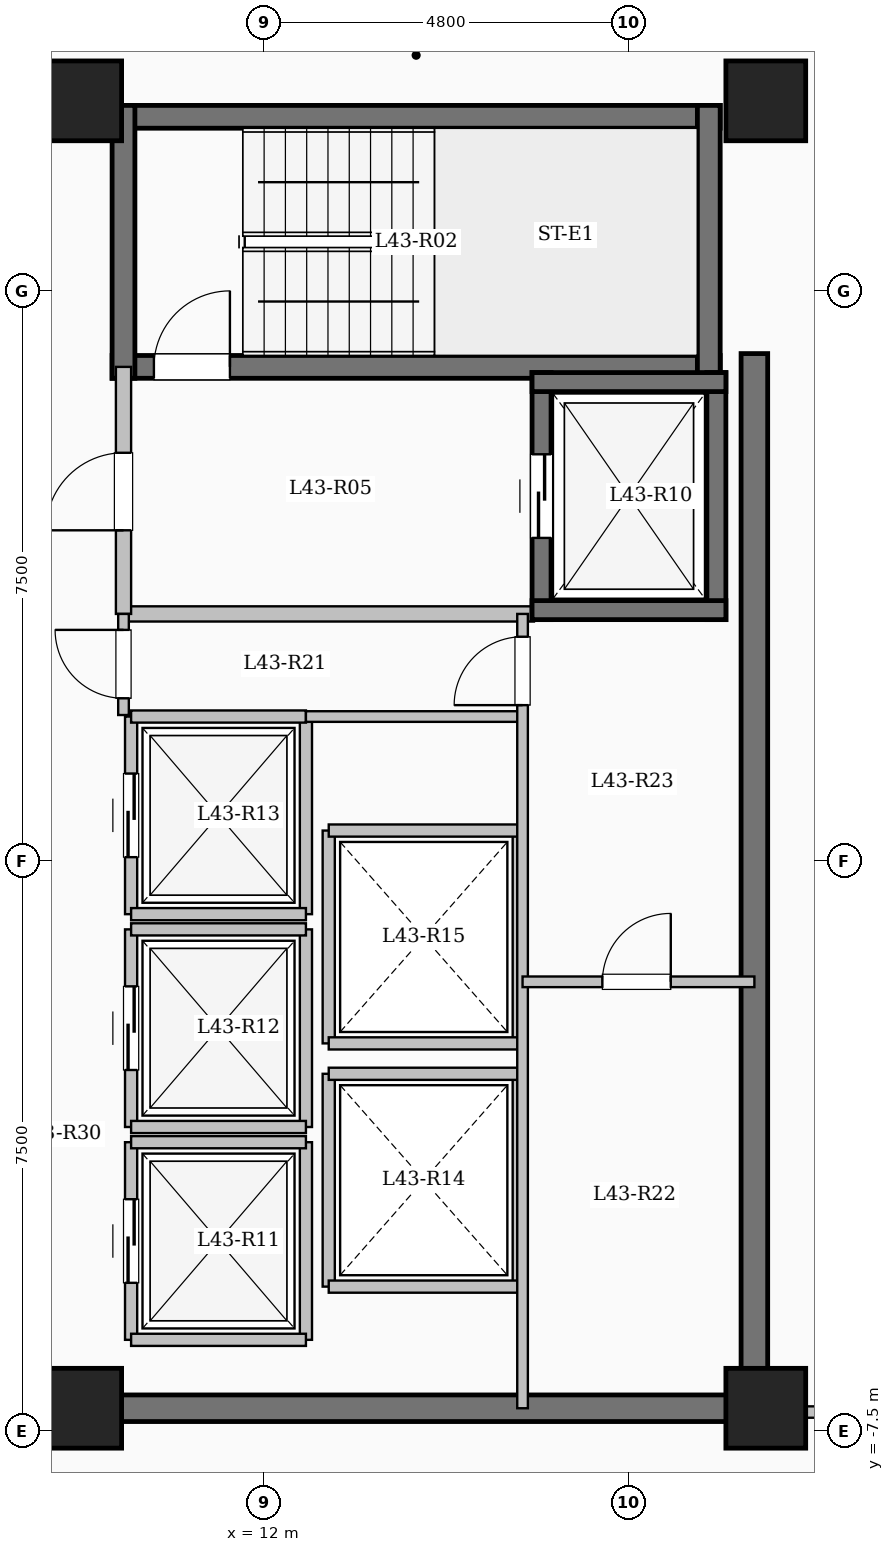
"""IFC4 building model, lengths in metres.
Left out: names, types, materials, properties, quantities, classifications, styles, units other than length and angle.
Written with IfcOpenShell. Run it as: python <this file> out.ifc"""

import sys

from ifc_helpers import new_model, si_unit, direction, frame, frame_2d, origin, origin_2d, place, context, subcontext, project, spatial, rectangle, extrude, element, fill, save


model = new_model("IFC4")
c1 = context("Model", 3, precision=1e-05, world=origin(), true_north=direction((0.0, 1.0)))
c2 = subcontext(c1, "Body", "Model", "MODEL_VIEW")
j1 = project(units=[si_unit("LENGTHUNIT", "METRE"), si_unit("PLANEANGLEUNIT", "RADIAN")], contexts=[c1])
p1 = place(None, origin())
s1 = spatial("IfcSite", under=j1, at=p1, CompositionType="ELEMENT")
p2 = place(p1, origin())
s2 = spatial("IfcBuilding", under=s1, at=p2, CompositionType="ELEMENT")
p3 = place(p2, frame((0.0, 0.0, 159.4)))
s3 = spatial("IfcBuildingStorey", under=s2, at=p3, CompositionType="ELEMENT", Elevation=159.4)
for number, where, z_axis, x_axis in (
    (1, (9.6, -7.2, 0.0), (0.0, 0.0, 1.0), (1.0, 0.0, 0.0)),
    (2, (9.6, 10.0, 0.0), (0.0, 0.0, 1.0), (1.0, 0.0, 0.0)),
    (3, (18.6, -7.2, 0.0), (0.0, 0.0, 1.0), (1.0, 0.0, 0.0)),
    (4, (18.6, 10.0, 0.0), (0.0, 0.0, 1.0), (1.0, 0.0, 0.0)),
):
    element("IfcColumn", number, at=place(p3, frame(where, z_axis=z_axis, x_axis=x_axis)), inside=s3, PredefinedType="COLUMN", context=c2, shape_type="SweptSolid", body=[
        extrude(rectangle(XDim=1.05, YDim=1.05, at=origin_2d()), origin(), (0.0, 0.0, 1.0), 3.35),
    ])
p4 = place(p3, frame((10.0, 9.79, 0.0), z_axis=(0.0, 0.0, 1.0), x_axis=(1.0, 0.0, 0.0)))
e5 = element("IfcWall", 5, at=p4, inside=s3, PredefinedType="SHEAR", context=c2, shape_type="SweptSolid", body=[
    extrude(rectangle(XDim=8.0, YDim=0.3, at=frame_2d((4.0, 0.0))), origin(), (0.0, 0.0, 1.0), 3.35),
])
p5 = place(p3, frame((10.0, 6.5, 0.0), z_axis=(0.0, 0.0, 1.0), x_axis=(1.0, 0.0, 0.0)))
e6 = element("IfcWall", 6, at=p5, inside=s3, PredefinedType="SHEAR", context=c2, shape_type="SweptSolid", body=[
    extrude(rectangle(XDim=8.0, YDim=0.3, at=frame_2d((4.0, 0.0))), origin(), (0.0, 0.0, 1.0), 3.35),
])
p6 = place(p5, frame((0.55, 0.0, 0.0)))
e7 = element("IfcOpeningElement", 7, at=p6, cuts=e6, PredefinedType="OPENING", context=c2, shape_type="SweptSolid", body=[
    extrude(rectangle(XDim=1.0, YDim=2.15, at=frame_2d((0.5, 1.075))), frame((0.0, 0.16, 0.0), z_axis=(0.0, -1.0, 0.0), x_axis=(1.0, 0.0, 0.0)), (0.0, 0.0, 1.0), 0.32),
])
for number, where, z_axis, x_axis in (
    (8, (10.15, 6.35, 0.0), (0.0, 0.0, 1.0), (0.0, 1.0, 0.0)),
    (9, (17.85, 6.35, 0.0), (0.0, 0.0, 1.0), (0.0, 1.0, 0.0)),
):
    element("IfcWall", number, at=place(p3, frame(where, z_axis=z_axis, x_axis=x_axis)), inside=s3, PredefinedType="SHEAR", context=c2, shape_type="SweptSolid", body=[
        extrude(rectangle(XDim=3.59, YDim=0.3, at=frame_2d((1.795, 0.0))), origin(), (0.0, 0.0, 1.0), 3.35),
    ])
p7 = place(p3, frame((10.15, 3.25, 0.0), z_axis=(0.0, 0.0, 1.0), x_axis=(1.0, 0.0, 0.0)))
e10 = element("IfcWall", 10, at=p7, inside=s3, PredefinedType="SOLIDWALL", context=c2, shape_type="SweptSolid", body=[
    extrude(rectangle(XDim=5.4, YDim=0.2, at=frame_2d((2.7, 0.0))), origin(), (0.0, 0.0, 1.0), 3.1),
])
p8 = place(p3, frame((10.15, 3.25, 0.0), z_axis=(0.0, 0.0, 1.0), x_axis=(0.0, 1.0, 0.0)))
e11 = element("IfcWall", 11, at=p8, inside=s3, PredefinedType="SOLIDWALL", context=c2, shape_type="SweptSolid", body=[
    extrude(rectangle(XDim=3.25, YDim=0.2, at=frame_2d((1.625, 0.0))), origin(), (0.0, 0.0, 1.0), 3.1),
])
p9 = place(p8, frame((1.1, 0.0, 0.0)))
e12 = element("IfcOpeningElement", 12, at=p9, cuts=e11, PredefinedType="OPENING", context=c2, shape_type="SweptSolid", body=[
    extrude(rectangle(XDim=1.02, YDim=2.15, at=frame_2d((0.51, 1.075))), frame((0.0, 0.11, 0.0), z_axis=(0.0, -1.0, 0.0), x_axis=(1.0, 0.0, 0.0)), (0.0, 0.0, 1.0), 0.22),
])
p10 = place(p3, frame((15.65, 3.175, 0.0), z_axis=(0.0, 0.0, 1.0), x_axis=(0.0, 1.0, 0.0)))
e13 = element("IfcWall", 13, at=p10, inside=s3, PredefinedType="SHEAR", context=c2, shape_type="SweptSolid", body=[
    extrude(rectangle(XDim=3.25, YDim=0.25, at=frame_2d((1.625, 0.0))), origin(), (0.0, 0.0, 1.0), 3.35),
])
p11 = place(p10, frame((1.075, 0.0, 0.0)))
e14 = element("IfcOpeningElement", 14, at=p11, cuts=e13, PredefinedType="OPENING", context=c2, shape_type="SweptSolid", body=[
    extrude(rectangle(XDim=1.1, YDim=2.15, at=frame_2d((0.55, 1.075))), frame((0.0, 0.135, 0.0), z_axis=(0.0, -1.0, 0.0), x_axis=(1.0, 0.0, 0.0)), (0.0, 0.0, 1.0), 0.27),
])
p12 = place(p3, frame((17.95, 3.175, 0.0), z_axis=(0.0, 0.0, 1.0), x_axis=(0.0, 1.0, 0.0)))
e15 = element("IfcWall", 15, at=p12, inside=s3, PredefinedType="SHEAR", context=c2, shape_type="SweptSolid", body=[
    extrude(rectangle(XDim=3.25, YDim=0.25, at=frame_2d((1.625, 0.0))), origin(), (0.0, 0.0, 1.0), 3.35),
])
for number, where, z_axis, x_axis in (
    (16, (15.525, 3.3, 0.0), (0.0, 0.0, 1.0), (1.0, 0.0, 0.0)),
    (17, (15.525, 6.3, 0.0), (0.0, 0.0, 1.0), (1.0, 0.0, 0.0)),
):
    element("IfcWall", number, at=place(p3, frame(where, z_axis=z_axis, x_axis=x_axis)), inside=s3, PredefinedType="SHEAR", context=c2, shape_type="SweptSolid", body=[
        extrude(rectangle(XDim=2.55, YDim=0.25, at=frame_2d((1.275, 0.0))), origin(), (0.0, 0.0, 1.0), 3.35),
    ])
p13 = place(p3, frame((10.25, -6.3, 0.0), z_axis=(0.0, 0.0, 1.0), x_axis=(0.0, 1.0, 0.0)))
e18 = element("IfcWall", 18, at=p13, inside=s3, PredefinedType="SOLIDWALL", context=c2, shape_type="SweptSolid", body=[
    extrude(rectangle(XDim=2.6, YDim=0.16, at=frame_2d((1.3, 0.0))), origin(), (0.0, 0.0, 1.0), 3.1),
])
p14 = place(p13, frame((0.75, 0.0, 0.0)))
e19 = element("IfcOpeningElement", 19, at=p14, cuts=e18, PredefinedType="OPENING", context=c2, shape_type="SweptSolid", body=[
    extrude(rectangle(XDim=1.1, YDim=2.15, at=frame_2d((0.55, 1.075))), frame((0.0, 0.09, 0.0), z_axis=(0.0, -1.0, 0.0), x_axis=(1.0, 0.0, 0.0)), (0.0, 0.0, 1.0), 0.18),
])
p15 = place(p3, frame((12.55, -6.3, 0.0), z_axis=(0.0, 0.0, 1.0), x_axis=(0.0, 1.0, 0.0)))
e20 = element("IfcWall", 20, at=p15, inside=s3, PredefinedType="SOLIDWALL", context=c2, shape_type="SweptSolid", body=[
    extrude(rectangle(XDim=2.6, YDim=0.16, at=frame_2d((1.3, 0.0))), origin(), (0.0, 0.0, 1.0), 3.1),
])
for number, where, z_axis, x_axis in (
    (21, (10.25, -6.3, 0.0), (0.0, 0.0, 1.0), (1.0, 0.0, 0.0)),
    (22, (10.25, -3.7, 0.0), (0.0, 0.0, 1.0), (1.0, 0.0, 0.0)),
):
    element("IfcWall", number, at=place(p3, frame(where, z_axis=z_axis, x_axis=x_axis)), inside=s3, PredefinedType="SOLIDWALL", context=c2, shape_type="SweptSolid", body=[
        extrude(rectangle(XDim=2.3, YDim=0.16, at=frame_2d((1.15, 0.0))), origin(), (0.0, 0.0, 1.0), 3.1),
    ])
p16 = place(p3, frame((10.25, -3.5, 0.0), z_axis=(0.0, 0.0, 1.0), x_axis=(0.0, 1.0, 0.0)))
e23 = element("IfcWall", 23, at=p16, inside=s3, PredefinedType="SOLIDWALL", context=c2, shape_type="SweptSolid", body=[
    extrude(rectangle(XDim=2.6, YDim=0.16, at=frame_2d((1.3, 0.0))), origin(), (0.0, 0.0, 1.0), 3.1),
])
p17 = place(p16, frame((0.75, 0.0, 0.0)))
e24 = element("IfcOpeningElement", 24, at=p17, cuts=e23, PredefinedType="OPENING", context=c2, shape_type="SweptSolid", body=[
    extrude(rectangle(XDim=1.1, YDim=2.15, at=frame_2d((0.55, 1.075))), frame((0.0, 0.09, 0.0), z_axis=(0.0, -1.0, 0.0), x_axis=(1.0, 0.0, 0.0)), (0.0, 0.0, 1.0), 0.18),
])
p18 = place(p3, frame((12.55, -3.5, 0.0), z_axis=(0.0, 0.0, 1.0), x_axis=(0.0, 1.0, 0.0)))
e25 = element("IfcWall", 25, at=p18, inside=s3, PredefinedType="SOLIDWALL", context=c2, shape_type="SweptSolid", body=[
    extrude(rectangle(XDim=2.6, YDim=0.16, at=frame_2d((1.3, 0.0))), origin(), (0.0, 0.0, 1.0), 3.1),
])
for number, where, z_axis, x_axis in (
    (26, (10.25, -3.5, 0.0), (0.0, 0.0, 1.0), (1.0, 0.0, 0.0)),
    (27, (10.25, -0.9, 0.0), (0.0, 0.0, 1.0), (1.0, 0.0, 0.0)),
):
    element("IfcWall", number, at=place(p3, frame(where, z_axis=z_axis, x_axis=x_axis)), inside=s3, PredefinedType="SOLIDWALL", context=c2, shape_type="SweptSolid", body=[
        extrude(rectangle(XDim=2.3, YDim=0.16, at=frame_2d((1.15, 0.0))), origin(), (0.0, 0.0, 1.0), 3.1),
    ])
p19 = place(p3, frame((10.25, -0.7, 0.0), z_axis=(0.0, 0.0, 1.0), x_axis=(0.0, 1.0, 0.0)))
e28 = element("IfcWall", 28, at=p19, inside=s3, PredefinedType="SOLIDWALL", context=c2, shape_type="SweptSolid", body=[
    extrude(rectangle(XDim=2.6, YDim=0.16, at=frame_2d((1.3, 0.0))), origin(), (0.0, 0.0, 1.0), 3.1),
])
p20 = place(p19, frame((0.75, 0.0, 0.0)))
e29 = element("IfcOpeningElement", 29, at=p20, cuts=e28, PredefinedType="OPENING", context=c2, shape_type="SweptSolid", body=[
    extrude(rectangle(XDim=1.1, YDim=2.15, at=frame_2d((0.55, 1.075))), frame((0.0, 0.09, 0.0), z_axis=(0.0, -1.0, 0.0), x_axis=(1.0, 0.0, 0.0)), (0.0, 0.0, 1.0), 0.18),
])
p21 = place(p3, frame((12.55, -0.7, 0.0), z_axis=(0.0, 0.0, 1.0), x_axis=(0.0, 1.0, 0.0)))
e30 = element("IfcWall", 30, at=p21, inside=s3, PredefinedType="SOLIDWALL", context=c2, shape_type="SweptSolid", body=[
    extrude(rectangle(XDim=2.6, YDim=0.16, at=frame_2d((1.3, 0.0))), origin(), (0.0, 0.0, 1.0), 3.1),
])
for number, where, z_axis, x_axis in (
    (31, (10.25, -0.7, 0.0), (0.0, 0.0, 1.0), (1.0, 0.0, 0.0)),
    (32, (10.25, 1.9, 0.0), (0.0, 0.0, 1.0), (1.0, 0.0, 0.0)),
):
    element("IfcWall", number, at=place(p3, frame(where, z_axis=z_axis, x_axis=x_axis)), inside=s3, PredefinedType="SOLIDWALL", context=c2, shape_type="SweptSolid", body=[
        extrude(rectangle(XDim=2.3, YDim=0.16, at=frame_2d((1.15, 0.0))), origin(), (0.0, 0.0, 1.0), 3.1),
    ])
for number, where, z_axis, x_axis in (
    (33, (12.85, -5.6, 0.0), (0.0, 0.0, 1.0), (0.0, 1.0, 0.0)),
    (34, (15.35, -5.6, 0.0), (0.0, 0.0, 1.0), (0.0, 1.0, 0.0)),
):
    element("IfcWall", number, at=place(p3, frame(where, z_axis=z_axis, x_axis=x_axis)), inside=s3, PredefinedType="SOLIDWALL", context=c2, shape_type="SweptSolid", body=[
        extrude(rectangle(XDim=2.8, YDim=0.16, at=frame_2d((1.4, 0.0))), origin(), (0.0, 0.0, 1.0), 3.1),
    ])
for number, where, z_axis, x_axis in (
    (35, (12.85, -5.6, 0.0), (0.0, 0.0, 1.0), (1.0, 0.0, 0.0)),
    (36, (12.85, -2.8, 0.0), (0.0, 0.0, 1.0), (1.0, 0.0, 0.0)),
):
    element("IfcWall", number, at=place(p3, frame(where, z_axis=z_axis, x_axis=x_axis)), inside=s3, PredefinedType="SOLIDWALL", context=c2, shape_type="SweptSolid", body=[
        extrude(rectangle(XDim=2.5, YDim=0.16, at=frame_2d((1.25, 0.0))), origin(), (0.0, 0.0, 1.0), 3.1),
    ])
for number, where, z_axis, x_axis in (
    (37, (12.85, -2.4, 0.0), (0.0, 0.0, 1.0), (0.0, 1.0, 0.0)),
    (38, (15.35, -2.4, 0.0), (0.0, 0.0, 1.0), (0.0, 1.0, 0.0)),
):
    element("IfcWall", number, at=place(p3, frame(where, z_axis=z_axis, x_axis=x_axis)), inside=s3, PredefinedType="SOLIDWALL", context=c2, shape_type="SweptSolid", body=[
        extrude(rectangle(XDim=2.8, YDim=0.16, at=frame_2d((1.4, 0.0))), origin(), (0.0, 0.0, 1.0), 3.1),
    ])
for number, where, z_axis, x_axis in (
    (39, (12.85, -2.4, 0.0), (0.0, 0.0, 1.0), (1.0, 0.0, 0.0)),
    (40, (12.85, 0.4, 0.0), (0.0, 0.0, 1.0), (1.0, 0.0, 0.0)),
):
    element("IfcWall", number, at=place(p3, frame(where, z_axis=z_axis, x_axis=x_axis)), inside=s3, PredefinedType="SOLIDWALL", context=c2, shape_type="SweptSolid", body=[
        extrude(rectangle(XDim=2.5, YDim=0.16, at=frame_2d((1.25, 0.0))), origin(), (0.0, 0.0, 1.0), 3.1),
    ])
p22 = place(p3, frame((18.45, -7.375, 0.0), z_axis=(0.0, 0.0, 1.0), x_axis=(0.0, 1.0, 0.0)))
e41 = element("IfcWall", 41, at=p22, inside=s3, PredefinedType="SHEAR", context=c2, shape_type="SweptSolid", body=[
    extrude(rectangle(XDim=14.05, YDim=0.35, at=frame_2d((7.025, 0.0))), origin(), (0.0, 0.0, 1.0), 3.35),
])
p23 = place(p3, frame((10.075, -7.2, 0.0), z_axis=(0.0, 0.0, 1.0), x_axis=(1.0, 0.0, 0.0)))
e42 = element("IfcWall", 42, at=p23, inside=s3, PredefinedType="SHEAR", context=c2, shape_type="SweptSolid", body=[
    extrude(rectangle(XDim=8.55, YDim=0.35, at=frame_2d((4.275, 0.0))), origin(), (0.0, 0.0, 1.0), 3.35),
])
p24 = place(p3, frame((12.55, 1.9, 0.0), z_axis=(0.0, 0.0, 1.0), x_axis=(1.0, 0.0, 0.0)))
e43 = element("IfcWall", 43, at=p24, inside=s3, PredefinedType="PARTITIONING", context=c2, shape_type="SweptSolid", body=[
    extrude(rectangle(XDim=2.85, YDim=0.14, at=frame_2d((1.425, 0.0))), origin(), (0.0, 0.0, 1.0), 3.1),
])
p25 = place(p3, frame((10.15, 1.92, 0.0), z_axis=(0.0, 0.0, 1.0), x_axis=(0.0, 1.0, 0.0)))
e44 = element("IfcWall", 44, at=p25, inside=s3, PredefinedType="PARTITIONING", context=c2, shape_type="SweptSolid", body=[
    extrude(rectangle(XDim=1.33, YDim=0.14, at=frame_2d((0.665, 0.0))), origin(), (0.0, 0.0, 1.0), 3.1),
])
p26 = place(p25, frame((0.22, 0.0, 0.0)))
e45 = element("IfcOpeningElement", 45, at=p26, cuts=e44, PredefinedType="OPENING", context=c2, shape_type="SweptSolid", body=[
    extrude(rectangle(XDim=0.9, YDim=2.08, at=frame_2d((0.45, 1.04))), frame((0.0, 0.08, 0.0), z_axis=(0.0, -1.0, 0.0), x_axis=(1.0, 0.0, 0.0)), (0.0, 0.0, 1.0), 0.16),
])
p27 = place(p3, frame((15.4, -7.2, 0.0), z_axis=(0.0, 0.0, 1.0), x_axis=(0.0, 1.0, 0.0)))
e46 = element("IfcWall", 46, at=p27, inside=s3, PredefinedType="PARTITIONING", context=c2, shape_type="SweptSolid", body=[
    extrude(rectangle(XDim=10.45, YDim=0.14, at=frame_2d((5.225, 0.0))), origin(), (0.0, 0.0, 1.0), 3.1),
])
p28 = place(p27, frame((9.25, 0.0, 0.0)))
e47 = element("IfcOpeningElement", 47, at=p28, cuts=e46, PredefinedType="OPENING", context=c2, shape_type="SweptSolid", body=[
    extrude(rectangle(XDim=0.9, YDim=2.08, at=frame_2d((0.45, 1.04))), frame((0.0, 0.08, 0.0), z_axis=(0.0, -1.0, 0.0), x_axis=(1.0, 0.0, 0.0)), (0.0, 0.0, 1.0), 0.16),
])
p29 = place(p3, frame((15.4, -1.59, 0.0), z_axis=(0.0, 0.0, 1.0), x_axis=(1.0, 0.0, 0.0)))
e48 = element("IfcWall", 48, at=p29, inside=s3, PredefinedType="PARTITIONING", context=c2, shape_type="SweptSolid", body=[
    extrude(rectangle(XDim=3.05, YDim=0.14, at=frame_2d((1.525, 0.0))), origin(), (0.0, 0.0, 1.0), 3.1),
])
p30 = place(p29, frame((1.05, 0.0, 0.0)))
e49 = element("IfcOpeningElement", 49, at=p30, cuts=e48, PredefinedType="OPENING", context=c2, shape_type="SweptSolid", body=[
    extrude(rectangle(XDim=0.9, YDim=2.08, at=frame_2d((0.45, 1.04))), frame((0.0, 0.08, 0.0), z_axis=(0.0, -1.0, 0.0), x_axis=(1.0, 0.0, 0.0)), (0.0, 0.0, 1.0), 0.16),
])
p31 = place(p3, frame((18.45, -7.25, 0.0), z_axis=(0.0, 0.0, 1.0), x_axis=(1.0, 0.0, 0.0)))
e50 = element("IfcWall", 50, at=p31, inside=s3, PredefinedType="PARTITIONING", context=c2, shape_type="SweptSolid", body=[
    extrude(rectangle(XDim=6.63, YDim=0.15, at=frame_2d((3.315, 0.0))), origin(), (0.0, 0.0, 1.0), 3.1),
])
p32 = place(p31, frame((1.95, 0.0, 0.0)))
e51 = element("IfcOpeningElement", 51, at=p32, cuts=e50, PredefinedType="OPENING", context=c2, shape_type="SweptSolid", body=[
    extrude(rectangle(XDim=1.08, YDim=2.15, at=frame_2d((0.54, 1.075))), frame((0.0, 0.085, 0.0), z_axis=(0.0, -1.0, 0.0), x_axis=(1.0, 0.0, 0.0)), (0.0, 0.0, 1.0), 0.17),
])
p33 = place(p6, origin())
e52 = element("IfcDoor", 52, at=p33, inside=s3, OperationType="SINGLE_SWING_RIGHT", PredefinedType="DOOR", context=c2, shape_type="SweptSolid", body=[
    extrude(rectangle(XDim=1.0, YDim=2.15, at=frame_2d((0.5, 1.075))), frame((0.0, 0.025, 0.0), z_axis=(0.0, -1.0, 0.0), x_axis=(1.0, 0.0, 0.0)), (0.0, 0.0, 1.0), 0.05),
])
fill(e7, e52)
p34 = place(p9, origin())
e53 = element("IfcDoor", 53, at=p34, inside=s3, OperationType="SINGLE_SWING_LEFT", PredefinedType="DOOR", context=c2, shape_type="SweptSolid", body=[
    extrude(rectangle(XDim=1.02, YDim=2.15, at=frame_2d((0.51, 1.075))), frame((0.0, 0.025, 0.0), z_axis=(0.0, -1.0, 0.0), x_axis=(1.0, 0.0, 0.0)), (0.0, 0.0, 1.0), 0.05),
])
fill(e12, e53)
p35 = place(p11, origin())
e54 = element("IfcDoor", 54, at=p35, inside=s3, OperationType="SLIDING_TO_LEFT", PredefinedType="DOOR", context=c2, shape_type="SweptSolid", body=[
    extrude(rectangle(XDim=1.1, YDim=2.15, at=frame_2d((0.55, 1.075))), frame((0.0, 0.025, 0.0), z_axis=(0.0, -1.0, 0.0), x_axis=(1.0, 0.0, 0.0)), (0.0, 0.0, 1.0), 0.05),
])
fill(e14, e54)
p36 = place(p14, origin())
e55 = element("IfcDoor", 55, at=p36, inside=s3, OperationType="SLIDING_TO_LEFT", PredefinedType="DOOR", context=c2, shape_type="SweptSolid", body=[
    extrude(rectangle(XDim=1.1, YDim=2.15, at=frame_2d((0.55, 1.075))), frame((0.0, 0.025, 0.0), z_axis=(0.0, -1.0, 0.0), x_axis=(1.0, 0.0, 0.0)), (0.0, 0.0, 1.0), 0.05),
])
fill(e19, e55)
p37 = place(p17, origin())
e56 = element("IfcDoor", 56, at=p37, inside=s3, OperationType="SLIDING_TO_LEFT", PredefinedType="DOOR", context=c2, shape_type="SweptSolid", body=[
    extrude(rectangle(XDim=1.1, YDim=2.15, at=frame_2d((0.55, 1.075))), frame((0.0, 0.025, 0.0), z_axis=(0.0, -1.0, 0.0), x_axis=(1.0, 0.0, 0.0)), (0.0, 0.0, 1.0), 0.05),
])
fill(e24, e56)
p38 = place(p20, origin())
e57 = element("IfcDoor", 57, at=p38, inside=s3, OperationType="SLIDING_TO_LEFT", PredefinedType="DOOR", context=c2, shape_type="SweptSolid", body=[
    extrude(rectangle(XDim=1.1, YDim=2.15, at=frame_2d((0.55, 1.075))), frame((0.0, 0.025, 0.0), z_axis=(0.0, -1.0, 0.0), x_axis=(1.0, 0.0, 0.0)), (0.0, 0.0, 1.0), 0.05),
])
fill(e29, e57)
p39 = place(p26, origin())
e58 = element("IfcDoor", 58, at=p39, inside=s3, OperationType="SINGLE_SWING_RIGHT", PredefinedType="DOOR", context=c2, shape_type="SweptSolid", body=[
    extrude(rectangle(XDim=0.9, YDim=2.08, at=frame_2d((0.45, 1.04))), frame((0.0, 0.025, 0.0), z_axis=(0.0, -1.0, 0.0), x_axis=(1.0, 0.0, 0.0)), (0.0, 0.0, 1.0), 0.05),
])
fill(e45, e58)
p40 = place(p28, origin())
e59 = element("IfcDoor", 59, at=p40, inside=s3, OperationType="SINGLE_SWING_LEFT", PredefinedType="DOOR", context=c2, shape_type="SweptSolid", body=[
    extrude(rectangle(XDim=0.9, YDim=2.08, at=frame_2d((0.45, 1.04))), frame((0.0, 0.025, 0.0), z_axis=(0.0, -1.0, 0.0), x_axis=(1.0, 0.0, 0.0)), (0.0, 0.0, 1.0), 0.05),
])
fill(e47, e59)
p41 = place(p30, origin())
e60 = element("IfcDoor", 60, at=p41, inside=s3, OperationType="SINGLE_SWING_RIGHT", PredefinedType="DOOR", context=c2, shape_type="SweptSolid", body=[
    extrude(rectangle(XDim=0.9, YDim=2.08, at=frame_2d((0.45, 1.04))), frame((0.0, 0.025, 0.0), z_axis=(0.0, -1.0, 0.0), x_axis=(1.0, 0.0, 0.0)), (0.0, 0.0, 1.0), 0.05),
])
fill(e49, e60)
save(model, sys.argv[1])
